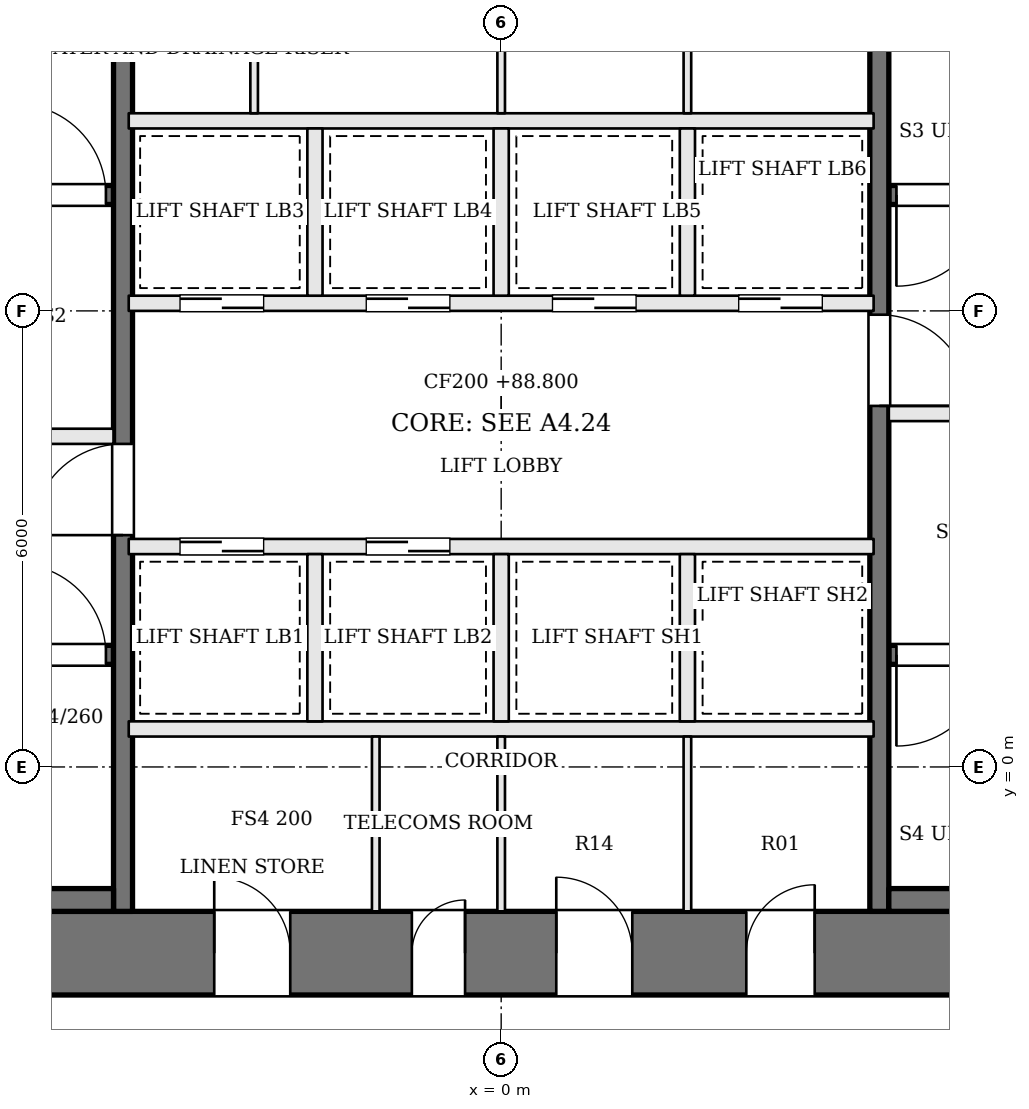
"""IFC4 building model, lengths in metres.
Left out: names, types, materials, properties, quantities, classifications, styles, units other than length and angle.
Written with IfcOpenShell. Run it as: python <this file> out.ifc"""

import sys

from ifc_helpers import new_model, si_unit, direction, frame, frame_2d, origin, place, context, subcontext, project, spatial, rectangle, extrude, element, fill, save


model = new_model("IFC4")
c1 = context("Model", 3, precision=1e-05, world=origin(), true_north=direction((0.0, 1.0)))
c2 = subcontext(c1, "Body", "Model", "MODEL_VIEW")
j1 = project(units=[si_unit("LENGTHUNIT", "METRE"), si_unit("PLANEANGLEUNIT", "RADIAN")], contexts=[c1])
p1 = place(None, origin())
s1 = spatial("IfcSite", under=j1, at=p1, CompositionType="ELEMENT")
p2 = place(p1, origin())
s2 = spatial("IfcBuilding", under=s1, at=p2, CompositionType="ELEMENT")
p3 = place(p2, frame((0.0, 0.0, 88.8)))
s3 = spatial("IfcBuildingStorey", under=s2, at=p3, CompositionType="ELEMENT", Elevation=88.8)
p4 = place(p3, frame((-13.0, -2.45, 0.0), z_axis=(0.0, 0.0, 1.0), x_axis=(1.0, 0.0, 0.0)))
e1 = element("IfcWall", 1, at=p4, inside=s3, PredefinedType="SHEAR", context=c2, shape_type="SweptSolid", body=[
    extrude(rectangle(XDim=26.0, YDim=1.1, at=frame_2d((13.0, 0.0))), origin(), (0.0, 0.0, 1.0), 3.6),
])
p5 = place(p4, frame((9.225, 0.0, 0.0)))
e2 = element("IfcOpeningElement", 2, at=p5, cuts=e1, PredefinedType="OPENING", context=c2, shape_type="SweptSolid", body=[
    extrude(rectangle(XDim=1.0, YDim=2.1, at=frame_2d((0.5, 1.05))), frame((0.0, 0.56, 0.0), z_axis=(0.0, -1.0, 0.0), x_axis=(1.0, 0.0, 0.0)), (0.0, 0.0, 1.0), 1.12),
])
p6 = place(p4, frame((11.825, 0.0, 0.0)))
e3 = element("IfcOpeningElement", 3, at=p6, cuts=e1, PredefinedType="OPENING", context=c2, shape_type="SweptSolid", body=[
    extrude(rectangle(XDim=0.7, YDim=2.1, at=frame_2d((0.35, 1.05))), frame((0.0, 0.56, 0.0), z_axis=(0.0, -1.0, 0.0), x_axis=(1.0, 0.0, 0.0)), (0.0, 0.0, 1.0), 1.12),
])
p7 = place(p4, frame((13.725, 0.0, 0.0)))
e4 = element("IfcOpeningElement", 4, at=p7, cuts=e1, PredefinedType="OPENING", context=c2, shape_type="SweptSolid", body=[
    extrude(rectangle(XDim=1.0, YDim=2.1, at=frame_2d((0.5, 1.05))), frame((0.0, 0.56, 0.0), z_axis=(0.0, -1.0, 0.0), x_axis=(1.0, 0.0, 0.0)), (0.0, 0.0, 1.0), 1.12),
])
p8 = place(p4, frame((16.225, 0.0, 0.0)))
e5 = element("IfcOpeningElement", 5, at=p8, cuts=e1, PredefinedType="OPENING", context=c2, shape_type="SweptSolid", body=[
    extrude(rectangle(XDim=0.9, YDim=2.1, at=frame_2d((0.45, 1.05))), frame((0.0, 0.56, 0.0), z_axis=(0.0, -1.0, 0.0), x_axis=(1.0, 0.0, 0.0)), (0.0, 0.0, 1.0), 1.12),
])
p9 = place(p3, frame((-11.9, 1.475, 0.0), z_axis=(0.0, 0.0, 1.0), x_axis=(1.0, 0.0, 0.0)))
e6 = element("IfcWall", 6, at=p9, inside=s3, PredefinedType="SOLIDWALL", context=c2, shape_type="SweptSolid", body=[
    extrude(rectangle(XDim=6.8, YDim=0.25, at=frame_2d((3.4, 0.0))), origin(), (0.0, 0.0, 1.0), 3.4),
])
p10 = place(p9, frame((5.5, 0.0, 0.0)))
e7 = element("IfcOpeningElement", 7, at=p10, cuts=e6, PredefinedType="OPENING", context=c2, shape_type="SweptSolid", body=[
    extrude(rectangle(XDim=1.2, YDim=2.1, at=frame_2d((0.6, 1.05))), frame((0.0, 0.135, 0.0), z_axis=(0.0, -1.0, 0.0), x_axis=(1.0, 0.0, 0.0)), (0.0, 0.0, 1.0), 0.27),
])
p11 = place(p3, frame((11.9, 7.525, 0.0), z_axis=(0.0, 0.0, 1.0), x_axis=(-1.0, 0.0, 0.0)))
e8 = element("IfcWall", 8, at=p11, inside=s3, PredefinedType="SOLIDWALL", context=c2, shape_type="SweptSolid", body=[
    extrude(rectangle(XDim=6.8, YDim=0.25, at=frame_2d((3.4, 0.0))), origin(), (0.0, 0.0, 1.0), 3.4),
])
p12 = place(p11, frame((5.5, 0.0, 0.0)))
e9 = element("IfcOpeningElement", 9, at=p12, cuts=e8, PredefinedType="OPENING", context=c2, shape_type="SweptSolid", body=[
    extrude(rectangle(XDim=1.2, YDim=2.1, at=frame_2d((0.6, 1.05))), frame((0.0, 0.135, 0.0), z_axis=(0.0, -1.0, 0.0), x_axis=(1.0, 0.0, 0.0)), (0.0, 0.0, 1.0), 0.27),
])
p13 = place(p3, frame((-11.9, 4.35, 0.0), z_axis=(0.0, 0.0, 1.0), x_axis=(1.0, 0.0, 0.0)))
e10 = element("IfcWall", 10, at=p13, inside=s3, PredefinedType="SOLIDWALL", context=c2, shape_type="SweptSolid", body=[
    extrude(rectangle(XDim=6.8, YDim=0.2, at=frame_2d((3.4, 0.0))), origin(), (0.0, 0.0, 1.0), 3.4),
])
p14 = place(p13, frame((4.1, 0.0, 0.0)))
e11 = element("IfcOpeningElement", 11, at=p14, cuts=e10, PredefinedType="OPENING", context=c2, shape_type="SweptSolid", body=[
    extrude(rectangle(XDim=1.2, YDim=2.1, at=frame_2d((0.6, 1.05))), frame((0.0, 0.11, 0.0), z_axis=(0.0, -1.0, 0.0), x_axis=(1.0, 0.0, 0.0)), (0.0, 0.0, 1.0), 0.22),
])
p15 = place(p13, frame((0.8, 0.0, 0.0)))
e12 = element("IfcOpeningElement", 12, at=p15, cuts=e10, PredefinedType="OPENING", context=c2, shape_type="SweptSolid", body=[
    extrude(rectangle(XDim=1.2, YDim=2.1, at=frame_2d((0.6, 1.05))), frame((0.0, 0.11, 0.0), z_axis=(0.0, -1.0, 0.0), x_axis=(1.0, 0.0, 0.0)), (0.0, 0.0, 1.0), 0.22),
])
p16 = place(p3, frame((11.9, 4.65, 0.0), z_axis=(0.0, 0.0, 1.0), x_axis=(-1.0, 0.0, 0.0)))
e13 = element("IfcWall", 13, at=p16, inside=s3, PredefinedType="SOLIDWALL", context=c2, shape_type="SweptSolid", body=[
    extrude(rectangle(XDim=6.8, YDim=0.2, at=frame_2d((3.4, 0.0))), origin(), (0.0, 0.0, 1.0), 3.4),
])
p17 = place(p16, frame((4.1, 0.0, 0.0)))
e14 = element("IfcOpeningElement", 14, at=p17, cuts=e13, PredefinedType="OPENING", context=c2, shape_type="SweptSolid", body=[
    extrude(rectangle(XDim=1.2, YDim=2.1, at=frame_2d((0.6, 1.05))), frame((0.0, 0.11, 0.0), z_axis=(0.0, -1.0, 0.0), x_axis=(1.0, 0.0, 0.0)), (0.0, 0.0, 1.0), 0.22),
])
p18 = place(p16, frame((0.8, 0.0, 0.0)))
e15 = element("IfcOpeningElement", 15, at=p18, cuts=e13, PredefinedType="OPENING", context=c2, shape_type="SweptSolid", body=[
    extrude(rectangle(XDim=1.2, YDim=2.1, at=frame_2d((0.6, 1.05))), frame((0.0, 0.11, 0.0), z_axis=(0.0, -1.0, 0.0), x_axis=(1.0, 0.0, 0.0)), (0.0, 0.0, 1.0), 0.22),
])
p19 = place(p3, frame((-11.9, 7.525, 0.0), z_axis=(0.0, 0.0, 1.0), x_axis=(1.0, 0.0, 0.0)))
e16 = element("IfcWall", 16, at=p19, inside=s3, PredefinedType="SOLIDWALL", context=c2, shape_type="SweptSolid", body=[
    extrude(rectangle(XDim=6.8, YDim=0.25, at=frame_2d((3.4, 0.0))), origin(), (0.0, 0.0, 1.0), 3.4),
])
p20 = place(p19, frame((5.5, 0.0, 0.0)))
e17 = element("IfcOpeningElement", 17, at=p20, cuts=e16, PredefinedType="OPENING", context=c2, shape_type="SweptSolid", body=[
    extrude(rectangle(XDim=1.2, YDim=2.1, at=frame_2d((0.6, 1.05))), frame((0.0, 0.135, 0.0), z_axis=(0.0, -1.0, 0.0), x_axis=(1.0, 0.0, 0.0)), (0.0, 0.0, 1.0), 0.27),
])
p21 = place(p3, frame((11.9, 1.475, 0.0), z_axis=(0.0, 0.0, 1.0), x_axis=(-1.0, 0.0, 0.0)))
e18 = element("IfcWall", 18, at=p21, inside=s3, PredefinedType="SOLIDWALL", context=c2, shape_type="SweptSolid", body=[
    extrude(rectangle(XDim=6.8, YDim=0.25, at=frame_2d((3.4, 0.0))), origin(), (0.0, 0.0, 1.0), 3.4),
])
p22 = place(p21, frame((5.5, 0.0, 0.0)))
e19 = element("IfcOpeningElement", 19, at=p22, cuts=e18, PredefinedType="OPENING", context=c2, shape_type="SweptSolid", body=[
    extrude(rectangle(XDim=1.2, YDim=2.1, at=frame_2d((0.6, 1.05))), frame((0.0, 0.135, 0.0), z_axis=(0.0, -1.0, 0.0), x_axis=(1.0, 0.0, 0.0)), (0.0, 0.0, 1.0), 0.27),
])
p23 = place(p3, frame((-4.975, -1.9, 0.0), z_axis=(0.0, 0.0, 1.0), x_axis=(0.0, 1.0, 0.0)))
e20 = element("IfcWall", 20, at=p23, inside=s3, PredefinedType="SOLIDWALL", context=c2, shape_type="SweptSolid", body=[
    extrude(rectangle(XDim=12.8, YDim=0.25, at=frame_2d((6.4, 0.0))), origin(), (0.0, 0.0, 1.0), 3.4),
])
p24 = place(p23, frame((4.95, 0.0, 0.0)))
e21 = element("IfcOpeningElement", 21, at=p24, cuts=e20, PredefinedType="OPENING", context=c2, shape_type="SweptSolid", body=[
    extrude(rectangle(XDim=1.2, YDim=2.1, at=frame_2d((0.6, 1.05))), frame((0.0, 0.135, 0.0), z_axis=(0.0, -1.0, 0.0), x_axis=(1.0, 0.0, 0.0)), (0.0, 0.0, 1.0), 0.27),
])
p25 = place(p3, frame((4.975, 10.9, 0.0), z_axis=(0.0, 0.0, 1.0), x_axis=(0.0, -1.0, 0.0)))
e22 = element("IfcWall", 22, at=p25, inside=s3, PredefinedType="SOLIDWALL", context=c2, shape_type="SweptSolid", body=[
    extrude(rectangle(XDim=12.8, YDim=0.25, at=frame_2d((6.4, 0.0))), origin(), (0.0, 0.0, 1.0), 3.4),
])
p26 = place(p25, frame((4.95, 0.0, 0.0)))
e23 = element("IfcOpeningElement", 23, at=p26, cuts=e22, PredefinedType="OPENING", context=c2, shape_type="SweptSolid", body=[
    extrude(rectangle(XDim=1.2, YDim=2.1, at=frame_2d((0.6, 1.05))), frame((0.0, 0.135, 0.0), z_axis=(0.0, -1.0, 0.0), x_axis=(1.0, 0.0, 0.0)), (0.0, 0.0, 1.0), 0.27),
])
for number, where, z_axis, x_axis in (
    (24, (-11.9, -1.75, 0.0), (0.0, 0.0, 1.0), (1.0, 0.0, 0.0)),
    (25, (11.9, -1.75, 0.0), (0.0, 0.0, 1.0), (-1.0, 0.0, 0.0)),
):
    element("IfcWall", number, at=place(p3, frame(where, z_axis=z_axis, x_axis=x_axis)), inside=s3, PredefinedType="SOLIDWALL", context=c2, shape_type="SweptSolid", body=[
        extrude(rectangle(XDim=6.8, YDim=0.3, at=frame_2d((3.4, 0.0))), origin(), (0.0, 0.0, 1.0), 3.4),
    ])
p27 = place(p3, frame((-4.9, 0.5, 0.0), z_axis=(0.0, 0.0, 1.0), x_axis=(1.0, 0.0, 0.0)))
e26 = element("IfcWall", 26, at=p27, inside=s3, PredefinedType="SOLIDWALL", context=c2, shape_type="SweptSolid", body=[
    extrude(rectangle(XDim=9.8, YDim=0.2, at=frame_2d((4.9, 0.0))), origin(), (0.0, 0.0, 1.0), 3.4),
])
p28 = place(p3, frame((-4.9, 2.9, 0.0), z_axis=(0.0, 0.0, 1.0), x_axis=(1.0, 0.0, 0.0)))
e27 = element("IfcWall", 27, at=p28, inside=s3, PredefinedType="SOLIDWALL", context=c2, shape_type="SweptSolid", body=[
    extrude(rectangle(XDim=9.8, YDim=0.2, at=frame_2d((4.9, 0.0))), origin(), (0.0, 0.0, 1.0), 3.4),
])
p29 = place(p28, frame((0.675, 0.0, 0.0)))
e28 = element("IfcOpeningElement", 28, at=p29, cuts=e27, PredefinedType="OPENING", context=c2, shape_type="SweptSolid", body=[
    extrude(rectangle(XDim=1.1, YDim=2.1, at=frame_2d((0.55, 1.05))), frame((0.0, 0.11, 0.0), z_axis=(0.0, -1.0, 0.0), x_axis=(1.0, 0.0, 0.0)), (0.0, 0.0, 1.0), 0.22),
])
p30 = place(p28, frame((3.125, 0.0, 0.0)))
e29 = element("IfcOpeningElement", 29, at=p30, cuts=e27, PredefinedType="OPENING", context=c2, shape_type="SweptSolid", body=[
    extrude(rectangle(XDim=1.1, YDim=2.1, at=frame_2d((0.55, 1.05))), frame((0.0, 0.11, 0.0), z_axis=(0.0, -1.0, 0.0), x_axis=(1.0, 0.0, 0.0)), (0.0, 0.0, 1.0), 0.22),
])
p31 = place(p3, frame((-4.9, 6.1, 0.0), z_axis=(0.0, 0.0, 1.0), x_axis=(1.0, 0.0, 0.0)))
e30 = element("IfcWall", 30, at=p31, inside=s3, PredefinedType="SOLIDWALL", context=c2, shape_type="SweptSolid", body=[
    extrude(rectangle(XDim=9.8, YDim=0.2, at=frame_2d((4.9, 0.0))), origin(), (0.0, 0.0, 1.0), 3.4),
])
p32 = place(p31, frame((0.675, 0.0, 0.0)))
e31 = element("IfcOpeningElement", 31, at=p32, cuts=e30, PredefinedType="OPENING", context=c2, shape_type="SweptSolid", body=[
    extrude(rectangle(XDim=1.1, YDim=2.1, at=frame_2d((0.55, 1.05))), frame((0.0, 0.11, 0.0), z_axis=(0.0, -1.0, 0.0), x_axis=(1.0, 0.0, 0.0)), (0.0, 0.0, 1.0), 0.22),
])
p33 = place(p31, frame((3.125, 0.0, 0.0)))
e32 = element("IfcOpeningElement", 32, at=p33, cuts=e30, PredefinedType="OPENING", context=c2, shape_type="SweptSolid", body=[
    extrude(rectangle(XDim=1.1, YDim=2.1, at=frame_2d((0.55, 1.05))), frame((0.0, 0.11, 0.0), z_axis=(0.0, -1.0, 0.0), x_axis=(1.0, 0.0, 0.0)), (0.0, 0.0, 1.0), 0.22),
])
p34 = place(p31, frame((5.575, 0.0, 0.0)))
e33 = element("IfcOpeningElement", 33, at=p34, cuts=e30, PredefinedType="OPENING", context=c2, shape_type="SweptSolid", body=[
    extrude(rectangle(XDim=1.1, YDim=2.1, at=frame_2d((0.55, 1.05))), frame((0.0, 0.11, 0.0), z_axis=(0.0, -1.0, 0.0), x_axis=(1.0, 0.0, 0.0)), (0.0, 0.0, 1.0), 0.22),
])
p35 = place(p31, frame((8.025, 0.0, 0.0)))
e34 = element("IfcOpeningElement", 34, at=p35, cuts=e30, PredefinedType="OPENING", context=c2, shape_type="SweptSolid", body=[
    extrude(rectangle(XDim=1.1, YDim=2.1, at=frame_2d((0.55, 1.05))), frame((0.0, 0.11, 0.0), z_axis=(0.0, -1.0, 0.0), x_axis=(1.0, 0.0, 0.0)), (0.0, 0.0, 1.0), 0.22),
])
p36 = place(p3, frame((-4.9, 8.5, 0.0), z_axis=(0.0, 0.0, 1.0), x_axis=(1.0, 0.0, 0.0)))
e35 = element("IfcWall", 35, at=p36, inside=s3, PredefinedType="SOLIDWALL", context=c2, shape_type="SweptSolid", body=[
    extrude(rectangle(XDim=9.8, YDim=0.2, at=frame_2d((4.9, 0.0))), origin(), (0.0, 0.0, 1.0), 3.4),
])
for number, where, z_axis, x_axis in (
    (36, (-2.45, 0.6, 0.0), (0.0, 0.0, 1.0), (0.0, 1.0, 0.0)),
    (37, (0.0, 0.6, 0.0), (0.0, 0.0, 1.0), (0.0, 1.0, 0.0)),
    (38, (2.45, 0.6, 0.0), (0.0, 0.0, 1.0), (0.0, 1.0, 0.0)),
    (39, (-2.45, 6.2, 0.0), (0.0, 0.0, 1.0), (0.0, 1.0, 0.0)),
    (40, (0.0, 6.2, 0.0), (0.0, 0.0, 1.0), (0.0, 1.0, 0.0)),
    (41, (2.45, 6.2, 0.0), (0.0, 0.0, 1.0), (0.0, 1.0, 0.0)),
):
    element("IfcWall", number, at=place(p3, frame(where, z_axis=z_axis, x_axis=x_axis)), inside=s3, PredefinedType="SOLIDWALL", context=c2, shape_type="SweptSolid", body=[
        extrude(rectangle(XDim=2.2, YDim=0.2, at=frame_2d((1.1, 0.0))), origin(), (0.0, 0.0, 1.0), 3.4),
    ])
for number, where, z_axis, x_axis in (
    (42, (-1.65, -1.9, 0.0), (0.0, 0.0, 1.0), (0.0, 1.0, 0.0)),
    (43, (0.0, -1.9, 0.0), (0.0, 0.0, 1.0), (0.0, 1.0, 0.0)),
    (44, (2.45, -1.9, 0.0), (0.0, 0.0, 1.0), (0.0, 1.0, 0.0)),
    (45, (-3.25, 8.6, 0.0), (0.0, 0.0, 1.0), (0.0, 1.0, 0.0)),
    (46, (0.0, 8.6, 0.0), (0.0, 0.0, 1.0), (0.0, 1.0, 0.0)),
    (47, (2.45, 8.6, 0.0), (0.0, 0.0, 1.0), (0.0, 1.0, 0.0)),
):
    element("IfcWall", number, at=place(p3, frame(where, z_axis=z_axis, x_axis=x_axis)), inside=s3, PredefinedType="PARTITIONING", context=c2, shape_type="SweptSolid", body=[
        extrude(rectangle(XDim=2.3, YDim=0.1, at=frame_2d((1.15, 0.0))), origin(), (0.0, 0.0, 1.0), 3.4),
    ])
p37 = place(p24, origin())
e48 = element("IfcDoor", 48, at=p37, inside=s3, OperationType="SINGLE_SWING_LEFT", PredefinedType="DOOR", context=c2, shape_type="SweptSolid", body=[
    extrude(rectangle(XDim=1.2, YDim=2.1, at=frame_2d((0.6, 1.05))), frame((0.0, 0.025, 0.0), z_axis=(0.0, -1.0, 0.0), x_axis=(1.0, 0.0, 0.0)), (0.0, 0.0, 1.0), 0.05),
])
fill(e21, e48)
p38 = place(p26, origin())
e49 = element("IfcDoor", 49, at=p38, inside=s3, OperationType="SINGLE_SWING_RIGHT", PredefinedType="DOOR", context=c2, shape_type="SweptSolid", body=[
    extrude(rectangle(XDim=1.2, YDim=2.1, at=frame_2d((0.6, 1.05))), frame((0.0, 0.025, 0.0), z_axis=(0.0, -1.0, 0.0), x_axis=(1.0, 0.0, 0.0)), (0.0, 0.0, 1.0), 0.05),
])
fill(e23, e49)
p39 = place(p10, origin())
e50 = element("IfcDoor", 50, at=p39, inside=s3, OperationType="SINGLE_SWING_LEFT", PredefinedType="DOOR", context=c2, shape_type="SweptSolid", body=[
    extrude(rectangle(XDim=1.2, YDim=2.1, at=frame_2d((0.6, 1.05))), frame((0.0, 0.025, 0.0), z_axis=(0.0, -1.0, 0.0), x_axis=(1.0, 0.0, 0.0)), (0.0, 0.0, 1.0), 0.05),
])
fill(e7, e50)
p40 = place(p12, origin())
e51 = element("IfcDoor", 51, at=p40, inside=s3, OperationType="SINGLE_SWING_RIGHT", PredefinedType="DOOR", context=c2, shape_type="SweptSolid", body=[
    extrude(rectangle(XDim=1.2, YDim=2.1, at=frame_2d((0.6, 1.05))), frame((0.0, 0.025, 0.0), z_axis=(0.0, -1.0, 0.0), x_axis=(1.0, 0.0, 0.0)), (0.0, 0.0, 1.0), 0.05),
])
fill(e9, e51)
p41 = place(p20, origin())
e52 = element("IfcDoor", 52, at=p41, inside=s3, OperationType="SINGLE_SWING_LEFT", PredefinedType="DOOR", context=c2, shape_type="SweptSolid", body=[
    extrude(rectangle(XDim=1.2, YDim=2.1, at=frame_2d((0.6, 1.05))), frame((0.0, 0.025, 0.0), z_axis=(0.0, -1.0, 0.0), x_axis=(1.0, 0.0, 0.0)), (0.0, 0.0, 1.0), 0.05),
])
fill(e17, e52)
p42 = place(p22, origin())
e53 = element("IfcDoor", 53, at=p42, inside=s3, OperationType="SINGLE_SWING_RIGHT", PredefinedType="DOOR", context=c2, shape_type="SweptSolid", body=[
    extrude(rectangle(XDim=1.2, YDim=2.1, at=frame_2d((0.6, 1.05))), frame((0.0, 0.025, 0.0), z_axis=(0.0, -1.0, 0.0), x_axis=(1.0, 0.0, 0.0)), (0.0, 0.0, 1.0), 0.05),
])
fill(e19, e53)
p43 = place(p29, origin())
e54 = element("IfcDoor", 54, at=p43, inside=s3, OperationType="SLIDING_TO_RIGHT", PredefinedType="DOOR", context=c2, shape_type="SweptSolid", body=[
    extrude(rectangle(XDim=1.1, YDim=2.1, at=frame_2d((0.55, 1.05))), frame((0.0, 0.025, 0.0), z_axis=(0.0, -1.0, 0.0), x_axis=(1.0, 0.0, 0.0)), (0.0, 0.0, 1.0), 0.05),
])
fill(e28, e54)
p44 = place(p30, origin())
e55 = element("IfcDoor", 55, at=p44, inside=s3, OperationType="SLIDING_TO_LEFT", PredefinedType="DOOR", context=c2, shape_type="SweptSolid", body=[
    extrude(rectangle(XDim=1.1, YDim=2.1, at=frame_2d((0.55, 1.05))), frame((0.0, 0.025, 0.0), z_axis=(0.0, -1.0, 0.0), x_axis=(1.0, 0.0, 0.0)), (0.0, 0.0, 1.0), 0.05),
])
fill(e29, e55)
p45 = place(p32, origin())
e56 = element("IfcDoor", 56, at=p45, inside=s3, OperationType="SLIDING_TO_RIGHT", PredefinedType="DOOR", context=c2, shape_type="SweptSolid", body=[
    extrude(rectangle(XDim=1.1, YDim=2.1, at=frame_2d((0.55, 1.05))), frame((0.0, 0.025, 0.0), z_axis=(0.0, -1.0, 0.0), x_axis=(1.0, 0.0, 0.0)), (0.0, 0.0, 1.0), 0.05),
])
fill(e31, e56)
p46 = place(p33, origin())
e57 = element("IfcDoor", 57, at=p46, inside=s3, OperationType="SLIDING_TO_LEFT", PredefinedType="DOOR", context=c2, shape_type="SweptSolid", body=[
    extrude(rectangle(XDim=1.1, YDim=2.1, at=frame_2d((0.55, 1.05))), frame((0.0, 0.025, 0.0), z_axis=(0.0, -1.0, 0.0), x_axis=(1.0, 0.0, 0.0)), (0.0, 0.0, 1.0), 0.05),
])
fill(e32, e57)
p47 = place(p34, origin())
e58 = element("IfcDoor", 58, at=p47, inside=s3, OperationType="SLIDING_TO_RIGHT", PredefinedType="DOOR", context=c2, shape_type="SweptSolid", body=[
    extrude(rectangle(XDim=1.1, YDim=2.1, at=frame_2d((0.55, 1.05))), frame((0.0, 0.025, 0.0), z_axis=(0.0, -1.0, 0.0), x_axis=(1.0, 0.0, 0.0)), (0.0, 0.0, 1.0), 0.05),
])
fill(e33, e58)
p48 = place(p35, origin())
e59 = element("IfcDoor", 59, at=p48, inside=s3, OperationType="SLIDING_TO_LEFT", PredefinedType="DOOR", context=c2, shape_type="SweptSolid", body=[
    extrude(rectangle(XDim=1.1, YDim=2.1, at=frame_2d((0.55, 1.05))), frame((0.0, 0.025, 0.0), z_axis=(0.0, -1.0, 0.0), x_axis=(1.0, 0.0, 0.0)), (0.0, 0.0, 1.0), 0.05),
])
fill(e34, e59)
p49 = place(p5, origin())
e60 = element("IfcDoor", 60, at=p49, inside=s3, OperationType="SINGLE_SWING_LEFT", PredefinedType="DOOR", context=c2, shape_type="SweptSolid", body=[
    extrude(rectangle(XDim=1.0, YDim=2.1, at=frame_2d((0.5, 1.05))), frame((0.0, 0.025, 0.0), z_axis=(0.0, -1.0, 0.0), x_axis=(1.0, 0.0, 0.0)), (0.0, 0.0, 1.0), 0.05),
])
fill(e2, e60)
p50 = place(p6, origin())
e61 = element("IfcDoor", 61, at=p50, inside=s3, OperationType="SINGLE_SWING_RIGHT", PredefinedType="DOOR", context=c2, shape_type="SweptSolid", body=[
    extrude(rectangle(XDim=0.7, YDim=2.1, at=frame_2d((0.35, 1.05))), frame((0.0, 0.025, 0.0), z_axis=(0.0, -1.0, 0.0), x_axis=(1.0, 0.0, 0.0)), (0.0, 0.0, 1.0), 0.05),
])
fill(e3, e61)
p51 = place(p7, origin())
e62 = element("IfcDoor", 62, at=p51, inside=s3, OperationType="SINGLE_SWING_LEFT", PredefinedType="DOOR", context=c2, shape_type="SweptSolid", body=[
    extrude(rectangle(XDim=1.0, YDim=2.1, at=frame_2d((0.5, 1.05))), frame((0.0, 0.025, 0.0), z_axis=(0.0, -1.0, 0.0), x_axis=(1.0, 0.0, 0.0)), (0.0, 0.0, 1.0), 0.05),
])
fill(e4, e62)
p52 = place(p8, origin())
e63 = element("IfcDoor", 63, at=p52, inside=s3, OperationType="SINGLE_SWING_RIGHT", PredefinedType="DOOR", context=c2, shape_type="SweptSolid", body=[
    extrude(rectangle(XDim=0.9, YDim=2.1, at=frame_2d((0.45, 1.05))), frame((0.0, 0.025, 0.0), z_axis=(0.0, -1.0, 0.0), x_axis=(1.0, 0.0, 0.0)), (0.0, 0.0, 1.0), 0.05),
])
fill(e5, e63)
save(model, sys.argv[1])
